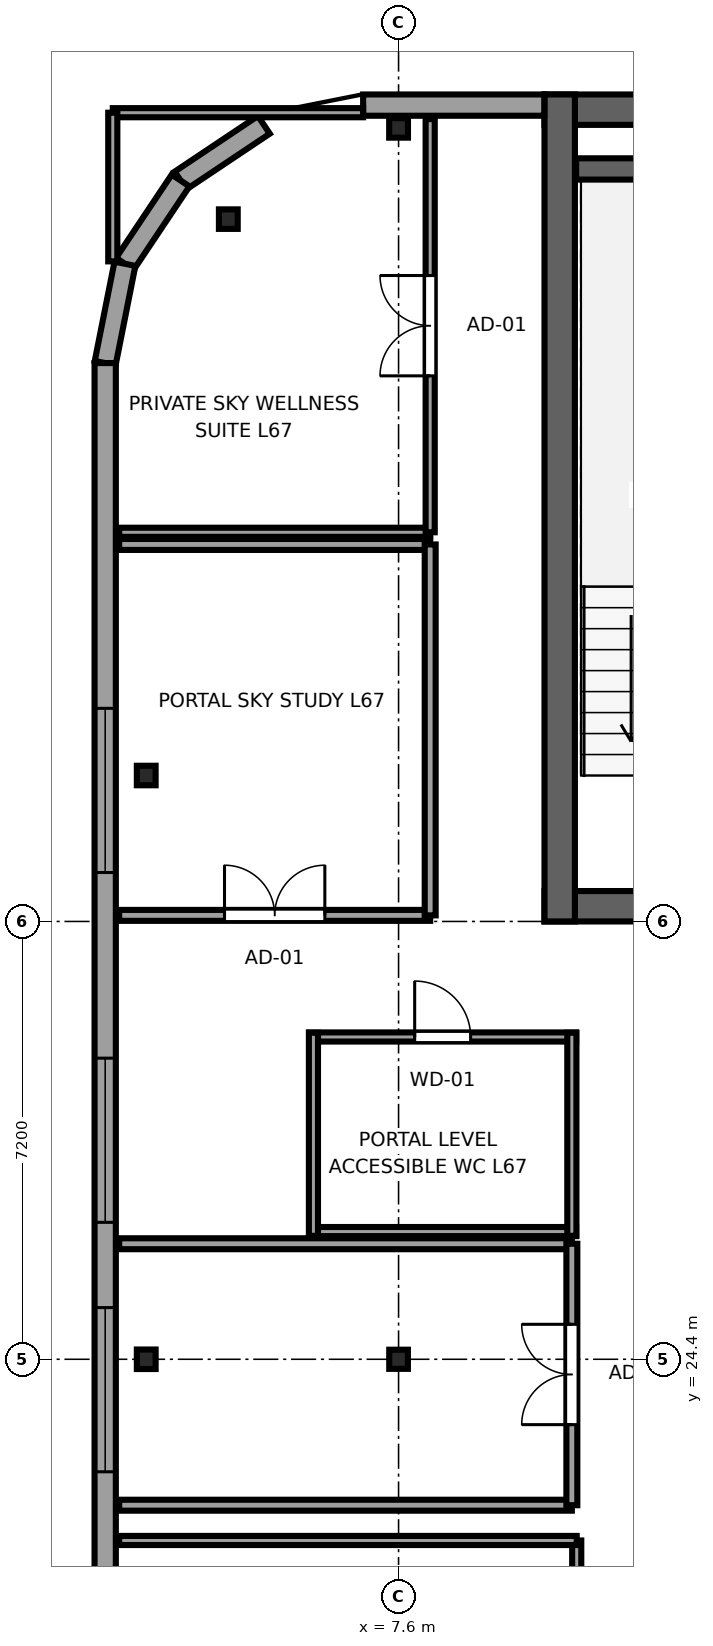
"""IFC4 building model, lengths in metres.
Left out: names, types, materials, properties, quantities, classifications, styles, units other than length and angle.
Written with IfcOpenShell. Run it as: python <this file> out.ifc"""

import sys

from ifc_helpers import new_model, si_unit, direction, frame, frame_2d, origin, origin_2d, place, context, subcontext, project, spatial, rectangle, i_section, extrude, source, transform, mapped, element, fill, save


model = new_model("IFC4")
c1 = context("Model", 3, precision=1e-05, world=origin(), true_north=direction((0.0, 1.0)))
c2 = subcontext(c1, "Body", "Model", "MODEL_VIEW")
j1 = project(units=[si_unit("LENGTHUNIT", "METRE"), si_unit("PLANEANGLEUNIT", "RADIAN")], contexts=[c1])
p1 = place(None, origin())
s1 = spatial("IfcSite", under=j1, at=p1, CompositionType="ELEMENT")
p2 = place(p1, origin())
s2 = spatial("IfcBuilding", under=s1, at=p2, CompositionType="ELEMENT")
p3 = place(p2, frame((0.0, 0.0, 252.3)))
s3 = spatial("IfcBuildingStorey", under=s2, at=p3, CompositionType="ELEMENT", Elevation=252.3)
p4 = place(p3, frame((10.0, 31.85, 0.0), z_axis=(0.0, 0.0, 1.0), x_axis=(1.0, 0.0, 0.0)))
e1 = element("IfcWall", 1, at=p4, inside=s3, PredefinedType="SHEAR", context=c2, shape_type="SweptSolid", body=[
    extrude(rectangle(XDim=26.0, YDim=0.5, at=frame_2d((13.0, 0.0))), origin(), (0.0, 0.0, 1.0), 3.55),
])
p5 = place(p4, frame((7.45, 0.0, 0.0), z_axis=(0.0, 0.0, 1.0), x_axis=(-1.0, 0.0, 0.0)))
e2 = element("IfcOpeningElement", 2, at=p5, cuts=e1, PredefinedType="OPENING", context=c2, shape_type="SweptSolid", body=[
    extrude(rectangle(XDim=1.5, YDim=2.04, at=frame_2d((0.75, 1.02))), frame((0.0, 0.26, 0.0), z_axis=(0.0, -1.0, 0.0), x_axis=(1.0, 0.0, 0.0)), (0.0, 0.0, 1.0), 0.52),
])
p6 = place(p4, frame((13.75, 0.0, 0.0), z_axis=(0.0, 0.0, 1.0), x_axis=(-1.0, 0.0, 0.0)))
e3 = element("IfcOpeningElement", 3, at=p6, cuts=e1, PredefinedType="OPENING", context=c2, shape_type="SweptSolid", body=[
    extrude(rectangle(XDim=1.5, YDim=2.04, at=frame_2d((0.75, 1.02))), frame((0.0, 0.26, 0.0), z_axis=(0.0, -1.0, 0.0), x_axis=(1.0, 0.0, 0.0)), (0.0, 0.0, 1.0), 0.52),
])
p7 = place(p4, frame((20.05, 0.0, 0.0), z_axis=(0.0, 0.0, 1.0), x_axis=(-1.0, 0.0, 0.0)))
e4 = element("IfcOpeningElement", 4, at=p7, cuts=e1, PredefinedType="OPENING", context=c2, shape_type="SweptSolid", body=[
    extrude(rectangle(XDim=1.5, YDim=2.04, at=frame_2d((0.75, 1.02))), frame((0.0, 0.26, 0.0), z_axis=(0.0, -1.0, 0.0), x_axis=(1.0, 0.0, 0.0)), (0.0, 0.0, 1.0), 0.52),
])
p8 = place(p3, frame((10.0, 44.95, 0.0), z_axis=(0.0, 0.0, 1.0), x_axis=(1.0, 0.0, 0.0)))
e5 = element("IfcWall", 5, at=p8, inside=s3, PredefinedType="SHEAR", context=c2, shape_type="SweptSolid", body=[
    extrude(rectangle(XDim=26.0, YDim=0.5, at=frame_2d((13.0, 0.0))), origin(), (0.0, 0.0, 1.0), 3.55),
])
p9 = place(p3, frame((10.25, 31.6, 0.0), z_axis=(0.0, 0.0, 1.0), x_axis=(0.0, 1.0, 0.0)))
e6 = element("IfcWall", 6, at=p9, inside=s3, PredefinedType="SHEAR", context=c2, shape_type="SweptSolid", body=[
    extrude(rectangle(XDim=13.6, YDim=0.5, at=frame_2d((6.8, 0.0))), origin(), (0.0, 0.0, 1.0), 3.55),
])
p10 = place(p3, frame((10.52, 43.975, 0.0), z_axis=(0.0, 0.0, 1.0), x_axis=(1.0, 0.0, 0.0)))
e7 = element("IfcWall", 7, at=p10, inside=s3, PredefinedType="SHEAR", context=c2, shape_type="SweptSolid", body=[
    extrude(rectangle(XDim=3.6, YDim=0.35, at=frame_2d((1.8, 0.0))), origin(), (0.0, 0.0, 1.0), 3.55),
])
m1 = source(origin(), c2, "Body", "SweptSolid", [
    extrude(i_section(OverallWidth=0.309, OverallDepth=0.321, WebThickness=0.014, FlangeThickness=0.022, FilletRadius=0.017, at=origin_2d()), origin(), (0.0, 0.0, 1.0), 3.55),
])
p11 = place(p3, frame((3.45, 24.4, 0.0), z_axis=(0.0, 0.0, 1.0), x_axis=(1.0, 0.0, 0.0)))
e8 = element("IfcColumn", 8, at=p11, inside=s3, PredefinedType="COLUMN", context=c2, shape_type="MappedRepresentation", body=[
    mapped(m1, transform((0.0, 0.0, 0.0), x_axis=(1.0, 0.0, 0.0), y_axis=(0.0, 1.0, 0.0), z_axis=(0.0, 0.0, 1.0), scale=1.0)),
])
m2 = source(origin(), c2, "Body", "SweptSolid", [
    extrude(i_section(OverallWidth=0.307, OverallDepth=0.315, WebThickness=0.012, FlangeThickness=0.019, FilletRadius=0.017, at=origin_2d()), origin(), (0.0, 0.0, 1.0), 3.55),
])
p12 = place(p3, frame((7.6, 24.4, 0.0), z_axis=(0.0, 0.0, 1.0), x_axis=(1.0, 0.0, 0.0)))
e9 = element("IfcColumn", 9, at=p12, inside=s3, PredefinedType="COLUMN", context=c2, shape_type="MappedRepresentation", body=[
    mapped(m2, transform((0.0, 0.0, 0.0), x_axis=(1.0, 0.0, 0.0), y_axis=(0.0, 1.0, 0.0), z_axis=(0.0, 0.0, 1.0), scale=1.0)),
])
for number, where, z_axis, x_axis in (
    (10, (4.8, 43.15, 0.0), (0.0, 0.0, 1.0), (1.0, 0.0, 0.0)),
    (11, (7.6, 44.65, 0.0), (0.0, 0.0, 1.0), (1.0, 0.0, 0.0)),
    (12, (3.45, 34.0, 0.0), (0.0, 0.0, 1.0), (1.0, 0.0, 0.0)),
):
    element("IfcColumn", number, at=place(p3, frame(where, z_axis=z_axis, x_axis=x_axis)), inside=s3, PredefinedType="COLUMN", context=c2, shape_type="MappedRepresentation", body=[
        mapped(m1, transform((0.0, 0.0, 0.0), x_axis=(1.0, 0.0, 0.0), y_axis=(0.0, 1.0, 0.0), z_axis=(0.0, 0.0, 1.0), scale=1.0)),
    ])
p13 = place(p3, frame((9.996, 45.025, 0.0), z_axis=(0.0, 0.0, 1.0), x_axis=(-1.0, 0.0, 0.0)))
e13 = element("IfcWall", 13, at=p13, inside=s3, PredefinedType="SOLIDWALL", context=c2, shape_type="SweptSolid", body=[
    extrude(rectangle(XDim=2.979, YDim=0.35, at=frame_2d((1.49, 0.0))), origin(), (0.0, 0.0, 1.0), 2.16),
])
for number, where, z_axis, x_axis in (
    (14, (5.385, 44.7, 0.0), (0.0, 0.0, 1.0), (-0.832, -0.556, 0.0)),
    (15, (4.015, 43.785, 0.0), (0.0, 0.0, 1.0), (-0.556, -0.831, 0.0)),
):
    element("IfcWall", number, at=place(p3, frame(where, z_axis=z_axis, x_axis=x_axis)), inside=s3, PredefinedType="SOLIDWALL", context=c2, shape_type="SweptSolid", body=[
        extrude(rectangle(XDim=1.647, YDim=0.35, at=frame_2d((0.824, 0.0))), origin(), (0.0, 0.0, 1.0), 2.9),
    ])
p14 = place(p3, frame((3.1, 42.416, 0.0), z_axis=(0.0, 0.0, 1.0), x_axis=(-0.195044345786, -0.980794424524, 0.0)))
e16 = element("IfcWall", 16, at=p14, inside=s3, PredefinedType="SOLIDWALL", context=c2, shape_type="SweptSolid", body=[
    extrude(rectangle(XDim=1.665, YDim=0.35, at=frame_2d((0.833, 0.0))), origin(), (0.0, 0.0, 1.0), 3.37),
])
p15 = place(p3, frame((2.775, 40.783, 0.0), z_axis=(0.0, 0.0, 1.0), x_axis=(0.0, -1.0, 0.0)))
e17 = element("IfcWall", 17, at=p15, inside=s3, PredefinedType="SOLIDWALL", context=c2, shape_type="SweptSolid", body=[
    extrude(rectangle(XDim=33.766, YDim=0.35, at=frame_2d((16.883, 0.0))), origin(), (0.0, 0.0, 1.0), 3.37),
])
p16 = place(p15, frame((5.678, 0.0, 0.68)))
e18 = element("IfcOpeningElement", 18, at=p16, cuts=e17, PredefinedType="OPENING", context=c2, shape_type="SweptSolid", body=[
    extrude(rectangle(XDim=2.7, YDim=1.95, at=frame_2d((1.35, 0.975))), frame((0.0, 0.185, 0.0), z_axis=(0.0, -1.0, 0.0), x_axis=(1.0, 0.0, 0.0)), (0.0, 0.0, 1.0), 0.37),
])
p17 = place(p15, frame((11.431, 0.0, 0.68)))
e19 = element("IfcOpeningElement", 19, at=p17, cuts=e17, PredefinedType="OPENING", context=c2, shape_type="SweptSolid", body=[
    extrude(rectangle(XDim=2.7, YDim=1.95, at=frame_2d((1.35, 0.975))), frame((0.0, 0.185, 0.0), z_axis=(0.0, -1.0, 0.0), x_axis=(1.0, 0.0, 0.0)), (0.0, 0.0, 1.0), 0.37),
])
p18 = place(p15, frame((15.533, 0.0, 0.68)))
e20 = element("IfcOpeningElement", 20, at=p18, cuts=e17, PredefinedType="OPENING", context=c2, shape_type="SweptSolid", body=[
    extrude(rectangle(XDim=2.7, YDim=1.95, at=frame_2d((1.35, 0.975))), frame((0.0, 0.185, 0.0), z_axis=(0.0, -1.0, 0.0), x_axis=(1.0, 0.0, 0.0)), (0.0, 0.0, 1.0), 0.37),
])
p19 = place(p15, frame((20.185, 0.0, 0.68)))
e21 = element("IfcOpeningElement", 21, at=p19, cuts=e17, PredefinedType="OPENING", context=c2, shape_type="SweptSolid", body=[
    extrude(rectangle(XDim=2.7, YDim=1.95, at=frame_2d((1.35, 0.975))), frame((0.0, 0.185, 0.0), z_axis=(0.0, -1.0, 0.0), x_axis=(1.0, 0.0, 0.0)), (0.0, 0.0, 1.0), 0.37),
])
p20 = place(p15, frame((24.837, 0.0, 0.68)))
e22 = element("IfcOpeningElement", 22, at=p20, cuts=e17, PredefinedType="OPENING", context=c2, shape_type="SweptSolid", body=[
    extrude(rectangle(XDim=2.7, YDim=1.95, at=frame_2d((1.35, 0.975))), frame((0.0, 0.185, 0.0), z_axis=(0.0, -1.0, 0.0), x_axis=(1.0, 0.0, 0.0)), (0.0, 0.0, 1.0), 0.37),
])
p21 = place(p15, frame((29.489, 0.0, 0.68)))
e23 = element("IfcOpeningElement", 23, at=p21, cuts=e17, PredefinedType="OPENING", context=c2, shape_type="SweptSolid", body=[
    extrude(rectangle(XDim=2.7, YDim=1.95, at=frame_2d((1.35, 0.975))), frame((0.0, 0.185, 0.0), z_axis=(0.0, -1.0, 0.0), x_axis=(1.0, 0.0, 0.0)), (0.0, 0.0, 1.0), 0.37),
])
p22 = place(p3, frame((10.53, 14.61, 0.0), z_axis=(0.0, 0.0, 1.0), x_axis=(0.0, 1.0, 0.0)))
e24 = element("IfcWall", 24, at=p22, inside=s3, PredefinedType="PARTITIONING", context=c2, shape_type="SweptSolid", body=[
    extrude(rectangle(XDim=6.81, YDim=0.15, at=frame_2d((3.405, 0.0))), origin(), (0.0, 0.0, 1.0), 3.37),
])
p23 = place(p22, frame((2.775, 0.0, 0.0)))
e25 = element("IfcOpeningElement", 25, at=p23, cuts=e24, PredefinedType="OPENING", context=c2, shape_type="SweptSolid", body=[
    extrude(rectangle(XDim=1.22, YDim=2.08, at=frame_2d((0.61, 1.04))), frame((0.0, 0.085, 0.0), z_axis=(0.0, -1.0, 0.0), x_axis=(1.0, 0.0, 0.0)), (0.0, 0.0, 1.0), 0.17),
])
p24 = place(p3, frame((3.005, 21.42, 0.0), z_axis=(0.0, 0.0, 1.0), x_axis=(1.0, 0.0, 0.0)))
e26 = element("IfcWall", 26, at=p24, inside=s3, PredefinedType="PARTITIONING", context=c2, shape_type="SweptSolid", body=[
    extrude(rectangle(XDim=7.525, YDim=0.15, at=frame_2d((3.763, 0.0))), origin(), (0.0, 0.0, 1.0), 3.37),
])
for number, where, z_axis, x_axis in (
    (27, (3.005, 22.0, 0.0), (0.0, 0.0, 1.0), (1.0, 0.0, 0.0)),
    (28, (3.005, 26.3, 0.0), (0.0, 0.0, 1.0), (1.0, 0.0, 0.0)),
):
    element("IfcWall", number, at=place(p3, frame(where, z_axis=z_axis, x_axis=x_axis)), inside=s3, PredefinedType="PARTITIONING", context=c2, shape_type="SweptSolid", body=[
        extrude(rectangle(XDim=7.445, YDim=0.18, at=frame_2d((3.723, 0.0))), origin(), (0.0, 0.0, 1.0), 3.37),
    ])
p25 = place(p3, frame((10.45, 22.0, 0.0), z_axis=(0.0, 0.0, 1.0), x_axis=(0.0, 1.0, 0.0)))
e29 = element("IfcWall", 29, at=p25, inside=s3, PredefinedType="PARTITIONING", context=c2, shape_type="SweptSolid", body=[
    extrude(rectangle(XDim=4.3, YDim=0.18, at=frame_2d((2.15, 0.0))), origin(), (0.0, 0.0, 1.0), 3.37),
])
p26 = place(p25, frame((1.325, 0.0, 0.0)))
e30 = element("IfcOpeningElement", 30, at=p26, cuts=e29, PredefinedType="OPENING", context=c2, shape_type="SweptSolid", body=[
    extrude(rectangle(XDim=1.65, YDim=2.15, at=frame_2d((0.825, 1.075))), frame((0.0, 0.1, 0.0), z_axis=(0.0, -1.0, 0.0), x_axis=(1.0, 0.0, 0.0)), (0.0, 0.0, 1.0), 0.2),
])
p27 = place(p3, frame((6.13, 26.5, 0.0), z_axis=(0.0, 0.0, 1.0), x_axis=(1.0, 0.0, 0.0)))
e31 = element("IfcWall", 31, at=p27, inside=s3, PredefinedType="PARTITIONING", context=c2, shape_type="SweptSolid", body=[
    extrude(rectangle(XDim=4.39, YDim=0.15, at=frame_2d((2.195, 0.0))), origin(), (0.0, 0.0, 1.0), 3.37),
])
p28 = place(p3, frame((6.13, 29.7, 0.0), z_axis=(0.0, 0.0, 1.0), x_axis=(1.0, 0.0, 0.0)))
e32 = element("IfcWall", 32, at=p28, inside=s3, PredefinedType="PARTITIONING", context=c2, shape_type="SweptSolid", body=[
    extrude(rectangle(XDim=4.39, YDim=0.15, at=frame_2d((2.195, 0.0))), origin(), (0.0, 0.0, 1.0), 3.37),
])
p29 = place(p28, frame((1.735, 0.0, 0.0)))
e33 = element("IfcOpeningElement", 33, at=p29, cuts=e32, PredefinedType="OPENING", context=c2, shape_type="SweptSolid", body=[
    extrude(rectangle(XDim=0.92, YDim=2.01, at=frame_2d((0.46, 1.005))), frame((0.0, 0.085, 0.0), z_axis=(0.0, -1.0, 0.0), x_axis=(1.0, 0.0, 0.0)), (0.0, 0.0, 1.0), 0.17),
])
for number, where, z_axis, x_axis in (
    (34, (6.2, 26.43, 0.0), (0.0, 0.0, 1.0), (0.0, 1.0, 0.0)),
    (35, (10.45, 26.43, 0.0), (0.0, 0.0, 1.0), (0.0, 1.0, 0.0)),
):
    element("IfcWall", number, at=place(p3, frame(where, z_axis=z_axis, x_axis=x_axis)), inside=s3, PredefinedType="PARTITIONING", context=c2, shape_type="SweptSolid", body=[
        extrude(rectangle(XDim=3.34, YDim=0.15, at=frame_2d((1.67, 0.0))), origin(), (0.0, 0.0, 1.0), 3.37),
    ])
p30 = place(p3, frame((3.005, 31.7, 0.0), z_axis=(0.0, 0.0, 1.0), x_axis=(1.0, 0.0, 0.0)))
e36 = element("IfcWall", 36, at=p30, inside=s3, PredefinedType="PARTITIONING", context=c2, shape_type="SweptSolid", body=[
    extrude(rectangle(XDim=5.115, YDim=0.18, at=frame_2d((2.558, 0.0))), origin(), (0.0, 0.0, 1.0), 3.37),
])
p31 = place(p30, frame((1.732, 0.0, 0.0)))
e37 = element("IfcOpeningElement", 37, at=p31, cuts=e36, PredefinedType="OPENING", context=c2, shape_type="SweptSolid", body=[
    extrude(rectangle(XDim=1.65, YDim=2.15, at=frame_2d((0.825, 1.075))), frame((0.0, 0.1, 0.0), z_axis=(0.0, -1.0, 0.0), x_axis=(1.0, 0.0, 0.0)), (0.0, 0.0, 1.0), 0.2),
])
p32 = place(p3, frame((3.005, 37.8, 0.0), z_axis=(0.0, 0.0, 1.0), x_axis=(1.0, 0.0, 0.0)))
e38 = element("IfcWall", 38, at=p32, inside=s3, PredefinedType="PARTITIONING", context=c2, shape_type="SweptSolid", body=[
    extrude(rectangle(XDim=5.115, YDim=0.18, at=frame_2d((2.558, 0.0))), origin(), (0.0, 0.0, 1.0), 3.37),
])
p33 = place(p3, frame((8.12, 31.7, 0.0), z_axis=(0.0, 0.0, 1.0), x_axis=(0.0, 1.0, 0.0)))
e39 = element("IfcWall", 39, at=p33, inside=s3, PredefinedType="PARTITIONING", context=c2, shape_type="SweptSolid", body=[
    extrude(rectangle(XDim=6.1, YDim=0.18, at=frame_2d((3.05, 0.0))), origin(), (0.0, 0.0, 1.0), 3.37),
])
p34 = place(p3, frame((3.005, 38.0, 0.0), z_axis=(0.0, 0.0, 1.0), x_axis=(1.0, 0.0, 0.0)))
e40 = element("IfcWall", 40, at=p34, inside=s3, PredefinedType="PARTITIONING", context=c2, shape_type="SweptSolid", body=[
    extrude(rectangle(XDim=5.115, YDim=0.15, at=frame_2d((2.558, 0.0))), origin(), (0.0, 0.0, 1.0), 3.37),
])
p35 = place(p3, frame((2.9, 44.9, 0.0), z_axis=(0.0, 0.0, 1.0), x_axis=(1.0, 0.0, 0.0)))
e41 = element("IfcWall", 41, at=p35, inside=s3, PredefinedType="PARTITIONING", context=c2, shape_type="SweptSolid", body=[
    extrude(rectangle(XDim=4.117, YDim=0.15, at=frame_2d((2.059, 0.0))), origin(), (0.0, 0.0, 1.0), 3.37),
])
p36 = place(p3, frame((2.9, 42.455, 0.0), z_axis=(0.0, 0.0, 1.0), x_axis=(0.0, 1.0, 0.0)))
e42 = element("IfcWall", 42, at=p36, inside=s3, PredefinedType="PARTITIONING", context=c2, shape_type="SweptSolid", body=[
    extrude(rectangle(XDim=2.445, YDim=0.15, at=frame_2d((1.222, 0.0))), origin(), (0.0, 0.0, 1.0), 3.37),
])
p37 = place(p3, frame((8.12, 38.0, 0.0), z_axis=(0.0, 0.0, 1.0), x_axis=(0.0, 1.0, 0.0)))
e43 = element("IfcWall", 43, at=p37, inside=s3, PredefinedType="PARTITIONING", context=c2, shape_type="SweptSolid", body=[
    extrude(rectangle(XDim=6.795, YDim=0.15, at=frame_2d((3.397, 0.0))), origin(), (0.0, 0.0, 1.0), 3.37),
])
p38 = place(p37, frame((2.573, 0.0, 0.0)))
e44 = element("IfcOpeningElement", 44, at=p38, cuts=e43, PredefinedType="OPENING", context=c2, shape_type="SweptSolid", body=[
    extrude(rectangle(XDim=1.65, YDim=2.15, at=frame_2d((0.825, 1.075))), frame((0.0, 0.085, 0.0), z_axis=(0.0, -1.0, 0.0), x_axis=(1.0, 0.0, 0.0)), (0.0, 0.0, 1.0), 0.17),
])
m3 = source(origin(), c2, "Body", "SweptSolid", [
    extrude(rectangle(XDim=2.7, YDim=1.95, at=frame_2d((1.35, 0.975))), frame((0.0, 0.09, 0.0), z_axis=(0.0, -1.0, 0.0), x_axis=(1.0, 0.0, 0.0)), (0.0, 0.0, 1.0), 0.06),
])
p39 = place(p16, origin())
e45 = element("IfcWindow", 45, at=p39, inside=s3, PartitioningType="TRIPLE_PANEL_HORIZONTAL", PredefinedType="WINDOW", context=c2, shape_type="MappedRepresentation", body=[
    mapped(m3, transform((0.0, 0.0, 0.0), x_axis=(1.0, 0.0, 0.0), y_axis=(0.0, 1.0, 0.0), z_axis=(0.0, 0.0, 1.0), scale=1.0)),
])
fill(e18, e45)
p40 = place(p17, origin())
e46 = element("IfcWindow", 46, at=p40, inside=s3, PartitioningType="TRIPLE_PANEL_HORIZONTAL", PredefinedType="WINDOW", context=c2, shape_type="MappedRepresentation", body=[
    mapped(m3, transform((0.0, 0.0, 0.0), x_axis=(1.0, 0.0, 0.0), y_axis=(0.0, 1.0, 0.0), z_axis=(0.0, 0.0, 1.0), scale=1.0)),
])
fill(e19, e46)
p41 = place(p18, origin())
e47 = element("IfcWindow", 47, at=p41, inside=s3, PartitioningType="TRIPLE_PANEL_HORIZONTAL", PredefinedType="WINDOW", context=c2, shape_type="MappedRepresentation", body=[
    mapped(m3, transform((0.0, 0.0, 0.0), x_axis=(1.0, 0.0, 0.0), y_axis=(0.0, 1.0, 0.0), z_axis=(0.0, 0.0, 1.0), scale=1.0)),
])
fill(e20, e47)
m4 = source(origin(), c2, "Body", "SweptSolid", [
    extrude(rectangle(XDim=1.65, YDim=2.15, at=frame_2d((0.825, 1.075))), frame((0.0, 0.025, 0.0), z_axis=(0.0, -1.0, 0.0), x_axis=(1.0, 0.0, 0.0)), (0.0, 0.0, 1.0), 0.05),
])
p42 = place(p26, origin())
e48 = element("IfcDoor", 48, at=p42, inside=s3, OperationType="DOUBLE_DOOR_SINGLE_SWING", PredefinedType="DOOR", context=c2, shape_type="MappedRepresentation", body=[
    mapped(m4, transform((0.0, 0.0, 0.0), x_axis=(1.0, 0.0, 0.0), y_axis=(0.0, 1.0, 0.0), z_axis=(0.0, 0.0, 1.0), scale=1.0)),
])
fill(e30, e48)
m5 = source(origin(), c2, "Body", "SweptSolid", [
    extrude(rectangle(XDim=0.92, YDim=2.01, at=frame_2d((0.46, 1.005))), frame((0.0, 0.025, 0.0), z_axis=(0.0, -1.0, 0.0), x_axis=(1.0, 0.0, 0.0)), (0.0, 0.0, 1.0), 0.05),
])
p43 = place(p29, origin())
e49 = element("IfcDoor", 49, at=p43, inside=s3, OperationType="SINGLE_SWING_LEFT", PredefinedType="DOOR", context=c2, shape_type="MappedRepresentation", body=[
    mapped(m5, transform((0.0, 0.0, 0.0), x_axis=(1.0, 0.0, 0.0), y_axis=(0.0, 1.0, 0.0), z_axis=(0.0, 0.0, 1.0), scale=1.0)),
])
fill(e33, e49)
p44 = place(p31, origin())
e50 = element("IfcDoor", 50, at=p44, inside=s3, OperationType="DOUBLE_DOOR_SINGLE_SWING", PredefinedType="DOOR", context=c2, shape_type="MappedRepresentation", body=[
    mapped(m4, transform((0.0, 0.0, 0.0), x_axis=(1.0, 0.0, 0.0), y_axis=(0.0, 1.0, 0.0), z_axis=(0.0, 0.0, 1.0), scale=1.0)),
])
fill(e37, e50)
p45 = place(p38, origin())
e51 = element("IfcDoor", 51, at=p45, inside=s3, OperationType="DOUBLE_DOOR_SINGLE_SWING", PredefinedType="DOOR", context=c2, shape_type="MappedRepresentation", body=[
    mapped(m4, transform((0.0, 0.0, 0.0), x_axis=(1.0, 0.0, 0.0), y_axis=(0.0, 1.0, 0.0), z_axis=(0.0, 0.0, 1.0), scale=1.0)),
])
fill(e44, e51)
save(model, sys.argv[1])
